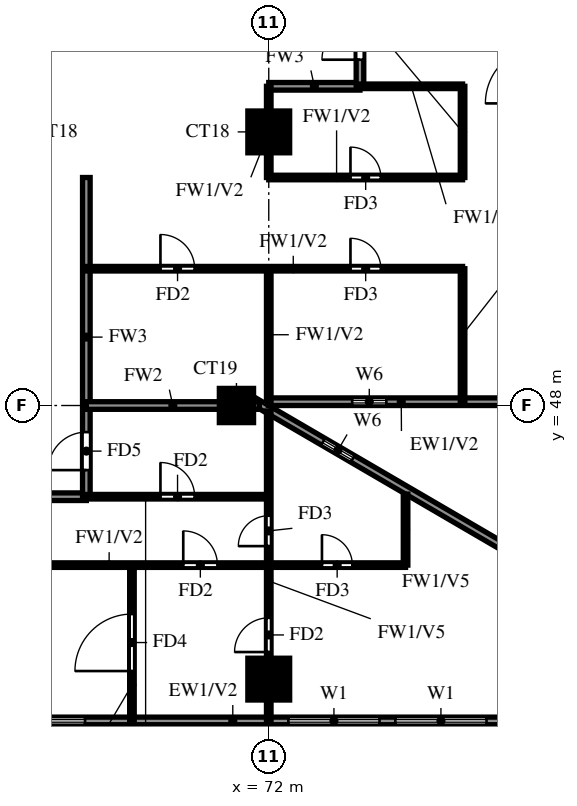
"""IFC4 building model, lengths in metres.
Left out: names, types, materials, properties, quantities, classifications, styles, units other than length and angle.
Written with IfcOpenShell. Run it as: python <this file> out.ifc"""

import sys

from ifc_helpers import new_model, si_unit, direction, frame, frame_2d, origin, origin_2d, place, context, subcontext, project, spatial, rectangle, extrude, source, transform, mapped, element, fill, save


model = new_model("IFC4")
c1 = context("Model", 3, precision=1e-05, world=origin(), true_north=direction((0.0, 1.0)))
c2 = subcontext(c1, "Body", "Model", "MODEL_VIEW")
j1 = project(units=[si_unit("LENGTHUNIT", "METRE"), si_unit("PLANEANGLEUNIT", "RADIAN")], contexts=[c1])
p1 = place(None, origin())
s1 = spatial("IfcSite", under=j1, at=p1, CompositionType="ELEMENT")
p2 = place(p1, origin())
s2 = spatial("IfcBuilding", under=s1, at=p2, CompositionType="ELEMENT")
p3 = place(p2, frame((0.0, 0.0, 120.0)))
s3 = spatial("IfcBuildingStorey", under=s2, at=p3, CompositionType="ELEMENT", Elevation=120.0)
m1 = source(origin(), c2, "Body", "SweptSolid", [
    extrude(rectangle(XDim=1.1, YDim=1.1, at=origin_2d()), origin(), (0.0, 0.0, 1.0), 3.2),
])
p4 = place(p3, frame((72.0, 40.8, 0.0), z_axis=(0.0, 0.0, 1.0), x_axis=(1.0, 0.0, 0.0)))
e1 = element("IfcColumn", 1, at=p4, inside=s3, PredefinedType="COLUMN", context=c2, shape_type="MappedRepresentation", body=[
    mapped(m1, transform((0.0, 0.0, 0.0))),
])
m2 = source(origin(), c2, "Body", "SweptSolid", [
    extrude(rectangle(XDim=0.9, YDim=0.9, at=origin_2d()), origin(), (0.0, 0.0, 1.0), 3.2),
])
p5 = place(p3, frame((71.15, 48.0, 0.0), z_axis=(0.0, 0.0, 1.0), x_axis=(1.0, 0.0, 0.0)))
e2 = element("IfcColumn", 2, at=p5, inside=s3, PredefinedType="COLUMN", context=c2, shape_type="MappedRepresentation", body=[
    mapped(m2, transform((0.0, 0.0, 0.0))),
])
p6 = place(p3, frame((72.0, 55.2, 0.0), z_axis=(0.0, 0.0, 1.0), x_axis=(1.0, 0.0, 0.0)))
e3 = element("IfcColumn", 3, at=p6, inside=s3, PredefinedType="COLUMN", context=c2, shape_type="MappedRepresentation", body=[
    mapped(m1, transform((0.0, 0.0, 0.0))),
])
p7 = place(p3, frame((85.719, 39.881, 0.0), z_axis=(0.0, 0.0, 1.0), x_axis=(-0.86377618652, 0.503875678716, 0.0)))
e4 = element("IfcWall", 4, at=p7, inside=s3, PredefinedType="SOLIDWALL", context=c2, shape_type="SweptSolid", body=[
    extrude(rectangle(XDim=16.311, YDim=0.2, at=frame_2d((8.156, 0.0))), origin(), (0.0, 0.0, 1.0), 3.2),
])
p8 = place(p7, frame((13.326, 0.0, 1.5)))
e5 = element("IfcOpeningElement", 5, at=p8, cuts=e4, PredefinedType="OPENING", context=c2, shape_type="SweptSolid", body=[
    extrude(rectangle(XDim=0.9, YDim=0.9, at=frame_2d((0.45, 0.45))), frame((0.0, 0.11, 0.0), z_axis=(0.0, -1.0, 0.0), x_axis=(1.0, 0.0, 0.0)), (0.0, 0.0, 1.0), 0.22),
])
p9 = place(p3, frame((71.99, 48.1, 0.0), z_axis=(0.0, 0.0, 1.0), x_axis=(1.0, 0.0, 0.0)))
e6 = element("IfcWall", 6, at=p9, inside=s3, PredefinedType="SOLIDWALL", context=c2, shape_type="SweptSolid", body=[
    extrude(rectangle(XDim=6.66, YDim=0.2, at=frame_2d((3.33, 0.0))), origin(), (0.0, 0.0, 1.0), 3.2),
])
p10 = place(p9, frame((2.205, 0.0, 1.5)))
e7 = element("IfcOpeningElement", 7, at=p10, cuts=e6, PredefinedType="OPENING", context=c2, shape_type="SweptSolid", body=[
    extrude(rectangle(XDim=0.9, YDim=0.9, at=frame_2d((0.45, 0.45))), frame((0.0, 0.11, 0.0), z_axis=(0.0, -1.0, 0.0), x_axis=(1.0, 0.0, 0.0)), (0.0, 0.0, 1.0), 0.22),
])
p11 = place(p3, frame((58.8, 39.7, 0.0), z_axis=(0.0, 0.0, 1.0), x_axis=(1.0, 0.0, 0.0)))
e8 = element("IfcWall", 8, at=p11, inside=s3, PredefinedType="SOLIDWALL", context=c2, shape_type="SweptSolid", body=[
    extrude(rectangle(XDim=27.23, YDim=0.2, at=frame_2d((13.615, 0.0))), origin(), (0.0, 0.0, 1.0), 3.2),
])
p12 = place(p11, frame((2.433, 0.0, 0.6)))
e9 = element("IfcOpeningElement", 9, at=p12, cuts=e8, PredefinedType="OPENING", context=c2, shape_type="SweptSolid", body=[
    extrude(rectangle(XDim=2.4, YDim=2.4, at=frame_2d((1.2, 1.2))), frame((0.0, 0.11, 0.0), z_axis=(0.0, -1.0, 0.0), x_axis=(1.0, 0.0, 0.0)), (0.0, 0.0, 1.0), 0.22),
])
p13 = place(p11, frame((5.967, 0.0, 0.6)))
e10 = element("IfcOpeningElement", 10, at=p13, cuts=e8, PredefinedType="OPENING", context=c2, shape_type="SweptSolid", body=[
    extrude(rectangle(XDim=2.4, YDim=2.4, at=frame_2d((1.2, 1.2))), frame((0.0, 0.11, 0.0), z_axis=(0.0, -1.0, 0.0), x_axis=(1.0, 0.0, 0.0)), (0.0, 0.0, 1.0), 0.22),
])
p14 = place(p11, frame((13.715, 0.0, 0.6)))
e11 = element("IfcOpeningElement", 11, at=p14, cuts=e8, PredefinedType="OPENING", context=c2, shape_type="SweptSolid", body=[
    extrude(rectangle(XDim=2.4, YDim=2.4, at=frame_2d((1.2, 1.2))), frame((0.0, 0.11, 0.0), z_axis=(0.0, -1.0, 0.0), x_axis=(1.0, 0.0, 0.0)), (0.0, 0.0, 1.0), 0.22),
])
p15 = place(p11, frame((16.531, 0.0, 0.6)))
e12 = element("IfcOpeningElement", 12, at=p15, cuts=e8, PredefinedType="OPENING", context=c2, shape_type="SweptSolid", body=[
    extrude(rectangle(XDim=2.4, YDim=2.4, at=frame_2d((1.2, 1.2))), frame((0.0, 0.11, 0.0), z_axis=(0.0, -1.0, 0.0), x_axis=(1.0, 0.0, 0.0)), (0.0, 0.0, 1.0), 0.22),
])
p16 = place(p11, frame((19.346, 0.0, 0.6)))
e13 = element("IfcOpeningElement", 13, at=p16, cuts=e8, PredefinedType="OPENING", context=c2, shape_type="SweptSolid", body=[
    extrude(rectangle(XDim=2.4, YDim=2.4, at=frame_2d((1.2, 1.2))), frame((0.0, 0.11, 0.0), z_axis=(0.0, -1.0, 0.0), x_axis=(1.0, 0.0, 0.0)), (0.0, 0.0, 1.0), 0.22),
])
p17 = place(p11, frame((22.161, 0.0, 0.6)))
e14 = element("IfcOpeningElement", 14, at=p17, cuts=e8, PredefinedType="OPENING", context=c2, shape_type="SweptSolid", body=[
    extrude(rectangle(XDim=2.4, YDim=2.4, at=frame_2d((1.2, 1.2))), frame((0.0, 0.11, 0.0), z_axis=(0.0, -1.0, 0.0), x_axis=(1.0, 0.0, 0.0)), (0.0, 0.0, 1.0), 0.22),
])
p18 = place(p11, frame((26.003, 0.0, 0.6)))
e15 = element("IfcOpeningElement", 15, at=p18, cuts=e8, PredefinedType="OPENING", context=c2, shape_type="SweptSolid", body=[
    extrude(rectangle(XDim=0.9, YDim=2.4, at=frame_2d((0.45, 1.2))), frame((0.0, 0.11, 0.0), z_axis=(0.0, -1.0, 0.0), x_axis=(1.0, 0.0, 0.0)), (0.0, 0.0, 1.0), 0.22),
])
p19 = place(p3, frame((60.0, 45.6, 0.0), z_axis=(0.0, 0.0, 1.0), x_axis=(1.0, 0.0, 0.0)))
e16 = element("IfcWall", 16, at=p19, inside=s3, PredefinedType="SOLIDWALL", context=c2, shape_type="SweptSolid", body=[
    extrude(rectangle(XDim=7.2, YDim=0.2, at=frame_2d((3.6, 0.0))), origin(), (0.0, 0.0, 1.0), 3.2),
])
p20 = place(p3, frame((72.0, 56.4, 0.0), z_axis=(0.0, 0.0, 1.0), x_axis=(1.0, 0.0, 0.0)))
e17 = element("IfcWall", 17, at=p20, inside=s3, PredefinedType="SOLIDWALL", context=c2, shape_type="SweptSolid", body=[
    extrude(rectangle(XDim=2.4, YDim=0.2, at=frame_2d((1.2, 0.0))), origin(), (0.0, 0.0, 1.0), 3.2),
])
p21 = place(p3, frame((67.2, 45.6, 0.0), z_axis=(0.0, 0.0, 1.0), x_axis=(0.0, 1.0, 0.0)))
e18 = element("IfcWall", 18, at=p21, inside=s3, PredefinedType="SOLIDWALL", context=c2, shape_type="SweptSolid", body=[
    extrude(rectangle(XDim=8.4, YDim=0.2, at=frame_2d((4.2, 0.0))), origin(), (0.0, 0.0, 1.0), 3.2),
])
p22 = place(p21, frame((0.7, 0.0, 0.0)))
e19 = element("IfcOpeningElement", 19, at=p22, cuts=e18, PredefinedType="OPENING", context=c2, shape_type="SweptSolid", body=[
    extrude(rectangle(XDim=1.0, YDim=2.1, at=frame_2d((0.5, 1.05))), frame((0.0, 0.11, 0.0), z_axis=(0.0, -1.0, 0.0), x_axis=(1.0, 0.0, 0.0)), (0.0, 0.0, 1.0), 0.22),
])
p23 = place(p3, frame((74.4, 56.4, 0.0), z_axis=(0.0, 0.0, 1.0), x_axis=(0.0, 1.0, 0.0)))
e20 = element("IfcWall", 20, at=p23, inside=s3, PredefinedType="SOLIDWALL", context=c2, shape_type="SweptSolid", body=[
    extrude(rectangle(XDim=9.6, YDim=0.2, at=frame_2d((4.8, 0.0))), origin(), (0.0, 0.0, 1.0), 3.2),
])
p24 = place(p23, frame((0.7, 0.0, 0.0)))
e21 = element("IfcOpeningElement", 21, at=p24, cuts=e20, PredefinedType="OPENING", context=c2, shape_type="SweptSolid", body=[
    extrude(rectangle(XDim=1.0, YDim=2.1, at=frame_2d((0.5, 1.05))), frame((0.0, 0.11, 0.0), z_axis=(0.0, -1.0, 0.0), x_axis=(1.0, 0.0, 0.0)), (0.0, 0.0, 1.0), 0.22),
])
p25 = place(p23, frame((3.1, 0.0, 0.0)))
e22 = element("IfcOpeningElement", 22, at=p25, cuts=e20, PredefinedType="OPENING", context=c2, shape_type="SweptSolid", body=[
    extrude(rectangle(XDim=1.0, YDim=2.1, at=frame_2d((0.5, 1.05))), frame((0.0, 0.11, 0.0), z_axis=(0.0, -1.0, 0.0), x_axis=(1.0, 0.0, 0.0)), (0.0, 0.0, 1.0), 0.22),
])
p26 = place(p3, frame((67.2, 48.0, 0.0), z_axis=(0.0, 0.0, 1.0), x_axis=(1.0, 0.0, 0.0)))
e23 = element("IfcWall", 23, at=p26, inside=s3, PredefinedType="SOLIDWALL", context=c2, shape_type="SweptSolid", body=[
    extrude(rectangle(XDim=4.552, YDim=0.2, at=frame_2d((2.276, 0.0))), origin(), (0.0, 0.0, 1.0), 3.2),
])
p27 = place(p3, frame((60.0, 43.8, 0.0), z_axis=(0.0, 0.0, 1.0), x_axis=(1.0, 0.0, 0.0)))
e24 = element("IfcWall", 24, at=p27, inside=s3, PredefinedType="PARTITIONING", context=c2, shape_type="SweptSolid", body=[
    extrude(rectangle(XDim=15.6, YDim=0.12, at=frame_2d((7.8, 0.0))), origin(), (0.0, 0.0, 1.0), 3.2),
])
p28 = place(p27, frame((9.75, 0.0, 0.0)))
e25 = element("IfcOpeningElement", 25, at=p28, cuts=e24, PredefinedType="OPENING", context=c2, shape_type="SweptSolid", body=[
    extrude(rectangle(XDim=0.9, YDim=2.1, at=frame_2d((0.45, 1.05))), frame((0.0, 0.07, 0.0), z_axis=(0.0, -1.0, 0.0), x_axis=(1.0, 0.0, 0.0)), (0.0, 0.0, 1.0), 0.14),
])
p29 = place(p27, frame((3.45, 0.0, 0.0)))
e26 = element("IfcOpeningElement", 26, at=p29, cuts=e24, PredefinedType="OPENING", context=c2, shape_type="SweptSolid", body=[
    extrude(rectangle(XDim=1.5, YDim=2.1, at=frame_2d((0.75, 1.05))), frame((0.0, 0.07, 0.0), z_axis=(0.0, -1.0, 0.0), x_axis=(1.0, 0.0, 0.0)), (0.0, 0.0, 1.0), 0.14),
])
p30 = place(p27, frame((13.4, 0.0, 0.0)))
e27 = element("IfcOpeningElement", 27, at=p30, cuts=e24, PredefinedType="OPENING", context=c2, shape_type="SweptSolid", body=[
    extrude(rectangle(XDim=0.8, YDim=2.1, at=frame_2d((0.4, 1.05))), frame((0.0, 0.07, 0.0), z_axis=(0.0, -1.0, 0.0), x_axis=(1.0, 0.0, 0.0)), (0.0, 0.0, 1.0), 0.14),
])
p31 = place(p3, frame((67.2, 45.6, 0.0), z_axis=(0.0, 0.0, 1.0), x_axis=(1.0, 0.0, 0.0)))
e28 = element("IfcWall", 28, at=p31, inside=s3, PredefinedType="PARTITIONING", context=c2, shape_type="SweptSolid", body=[
    extrude(rectangle(XDim=4.8, YDim=0.12, at=frame_2d((2.4, 0.0))), origin(), (0.0, 0.0, 1.0), 3.2),
])
p32 = place(p31, frame((1.95, 0.0, 0.0)))
e29 = element("IfcOpeningElement", 29, at=p32, cuts=e28, PredefinedType="OPENING", context=c2, shape_type="SweptSolid", body=[
    extrude(rectangle(XDim=0.9, YDim=2.1, at=frame_2d((0.45, 1.05))), frame((0.0, 0.07, 0.0), z_axis=(0.0, -1.0, 0.0), x_axis=(1.0, 0.0, 0.0)), (0.0, 0.0, 1.0), 0.14),
])
p33 = place(p3, frame((67.2, 51.6, 0.0), z_axis=(0.0, 0.0, 1.0), x_axis=(1.0, 0.0, 0.0)))
e30 = element("IfcWall", 30, at=p33, inside=s3, PredefinedType="PARTITIONING", context=c2, shape_type="SweptSolid", body=[
    extrude(rectangle(XDim=9.9, YDim=0.12, at=frame_2d((4.95, 0.0))), origin(), (0.0, 0.0, 1.0), 3.2),
])
p34 = place(p33, frame((6.95, 0.0, 0.0)))
e31 = element("IfcOpeningElement", 31, at=p34, cuts=e30, PredefinedType="OPENING", context=c2, shape_type="SweptSolid", body=[
    extrude(rectangle(XDim=0.8, YDim=2.1, at=frame_2d((0.4, 1.05))), frame((0.0, 0.07, 0.0), z_axis=(0.0, -1.0, 0.0), x_axis=(1.0, 0.0, 0.0)), (0.0, 0.0, 1.0), 0.14),
])
p35 = place(p33, frame((1.95, 0.0, 0.0)))
e32 = element("IfcOpeningElement", 32, at=p35, cuts=e30, PredefinedType="OPENING", context=c2, shape_type="SweptSolid", body=[
    extrude(rectangle(XDim=0.9, YDim=2.1, at=frame_2d((0.45, 1.05))), frame((0.0, 0.07, 0.0), z_axis=(0.0, -1.0, 0.0), x_axis=(1.0, 0.0, 0.0)), (0.0, 0.0, 1.0), 0.14),
])
p36 = place(p3, frame((72.0, 54.0, 0.0), z_axis=(0.0, 0.0, 1.0), x_axis=(1.0, 0.0, 0.0)))
e33 = element("IfcWall", 33, at=p36, inside=s3, PredefinedType="PARTITIONING", context=c2, shape_type="SweptSolid", body=[
    extrude(rectangle(XDim=5.1, YDim=0.12, at=frame_2d((2.55, 0.0))), origin(), (0.0, 0.0, 1.0), 3.2),
])
p37 = place(p36, frame((2.15, 0.0, 0.0)))
e34 = element("IfcOpeningElement", 34, at=p37, cuts=e33, PredefinedType="OPENING", context=c2, shape_type="SweptSolid", body=[
    extrude(rectangle(XDim=0.8, YDim=2.1, at=frame_2d((0.4, 1.05))), frame((0.0, 0.07, 0.0), z_axis=(0.0, -1.0, 0.0), x_axis=(1.0, 0.0, 0.0)), (0.0, 0.0, 1.0), 0.14),
])
p38 = place(p3, frame((74.4, 56.4, 0.0), z_axis=(0.0, 0.0, 1.0), x_axis=(1.0, 0.0, 0.0)))
e35 = element("IfcWall", 35, at=p38, inside=s3, PredefinedType="PARTITIONING", context=c2, shape_type="SweptSolid", body=[
    extrude(rectangle(XDim=2.7, YDim=0.12, at=frame_2d((1.35, 0.0))), origin(), (0.0, 0.0, 1.0), 3.2),
])
p39 = place(p3, frame((68.4, 39.725, 0.0), z_axis=(0.0, 0.0, 1.0), x_axis=(0.0, 1.0, 0.0)))
e36 = element("IfcWall", 36, at=p39, inside=s3, PredefinedType="PARTITIONING", context=c2, shape_type="SweptSolid", body=[
    extrude(rectangle(XDim=4.075, YDim=0.12, at=frame_2d((2.038, 0.0))), origin(), (0.0, 0.0, 1.0), 3.2),
])
p40 = place(p39, frame((1.288, 0.0, 0.0)))
e37 = element("IfcOpeningElement", 37, at=p40, cuts=e36, PredefinedType="OPENING", context=c2, shape_type="SweptSolid", body=[
    extrude(rectangle(XDim=1.5, YDim=2.1, at=frame_2d((0.75, 1.05))), frame((0.0, 0.07, 0.0), z_axis=(0.0, -1.0, 0.0), x_axis=(1.0, 0.0, 0.0)), (0.0, 0.0, 1.0), 0.14),
])
p41 = place(p3, frame((72.0, 39.725, 0.0), z_axis=(0.0, 0.0, 1.0), x_axis=(0.0, 1.0, 0.0)))
e38 = element("IfcWall", 38, at=p41, inside=s3, PredefinedType="PARTITIONING", context=c2, shape_type="SweptSolid", body=[
    extrude(rectangle(XDim=8.13, YDim=0.12, at=frame_2d((4.065, 0.0))), origin(), (0.0, 0.0, 1.0), 2.3),
])
p42 = place(p41, frame((1.788, 0.0, 0.0)))
e39 = element("IfcOpeningElement", 39, at=p42, cuts=e38, PredefinedType="OPENING", context=c2, shape_type="SweptSolid", body=[
    extrude(rectangle(XDim=0.9, YDim=2.1, at=frame_2d((0.45, 1.05))), frame((0.0, 0.07, 0.0), z_axis=(0.0, -1.0, 0.0), x_axis=(1.0, 0.0, 0.0)), (0.0, 0.0, 1.0), 0.14),
])
p43 = place(p41, frame((4.575, 0.0, 0.0)))
e40 = element("IfcOpeningElement", 40, at=p43, cuts=e38, PredefinedType="OPENING", context=c2, shape_type="SweptSolid", body=[
    extrude(rectangle(XDim=0.8, YDim=2.1, at=frame_2d((0.4, 1.05))), frame((0.0, 0.07, 0.0), z_axis=(0.0, -1.0, 0.0), x_axis=(1.0, 0.0, 0.0)), (0.0, 0.0, 1.0), 0.14),
])
p44 = place(p3, frame((72.0, 48.125, 0.0), z_axis=(0.0, 0.0, 1.0), x_axis=(0.0, 1.0, 0.0)))
e41 = element("IfcWall", 41, at=p44, inside=s3, PredefinedType="PARTITIONING", context=c2, shape_type="SweptSolid", body=[
    extrude(rectangle(XDim=3.475, YDim=0.12, at=frame_2d((1.738, 0.0))), origin(), (0.0, 0.0, 1.0), 3.2),
])
p45 = place(p3, frame((72.0, 54.0, 0.0), z_axis=(0.0, 0.0, 1.0), x_axis=(0.0, 1.0, 0.0)))
e42 = element("IfcWall", 42, at=p45, inside=s3, PredefinedType="PARTITIONING", context=c2, shape_type="SweptSolid", body=[
    extrude(rectangle(XDim=2.4, YDim=0.12, at=frame_2d((1.2, 0.0))), origin(), (0.0, 0.0, 1.0), 3.2),
])
p46 = place(p3, frame((75.6, 43.8, 0.0), z_axis=(0.0, 0.0, 1.0), x_axis=(0.0, 1.0, 0.0)))
e43 = element("IfcWall", 43, at=p46, inside=s3, PredefinedType="PARTITIONING", context=c2, shape_type="SweptSolid", body=[
    extrude(rectangle(XDim=1.868, YDim=0.12, at=frame_2d((0.934, 0.0))), origin(), (0.0, 0.0, 1.0), 2.3),
])
p47 = place(p3, frame((77.1, 48.125, 0.0), z_axis=(0.0, 0.0, 1.0), x_axis=(0.0, 1.0, 0.0)))
e44 = element("IfcWall", 44, at=p47, inside=s3, PredefinedType="PARTITIONING", context=c2, shape_type="SweptSolid", body=[
    extrude(rectangle(XDim=3.475, YDim=0.12, at=frame_2d((1.738, 0.0))), origin(), (0.0, 0.0, 1.0), 3.2),
])
p48 = place(p3, frame((77.1, 54.0, 0.0), z_axis=(0.0, 0.0, 1.0), x_axis=(0.0, 1.0, 0.0)))
e45 = element("IfcWall", 45, at=p48, inside=s3, PredefinedType="PARTITIONING", context=c2, shape_type="SweptSolid", body=[
    extrude(rectangle(XDim=2.4, YDim=0.12, at=frame_2d((1.2, 0.0))), origin(), (0.0, 0.0, 1.0), 3.2),
])
p49 = place(p8, origin())
e46 = element("IfcWindow", 46, at=p49, inside=s3, PartitioningType="SINGLE_PANEL", PredefinedType="WINDOW", context=c2, shape_type="SweptSolid", body=[
    extrude(rectangle(XDim=0.9, YDim=0.9, at=frame_2d((0.45, 0.45))), frame((0.0, 0.03, 0.0), z_axis=(0.0, -1.0, 0.0), x_axis=(1.0, 0.0, 0.0)), (0.0, 0.0, 1.0), 0.06),
])
fill(e5, e46)
p50 = place(p10, origin())
e47 = element("IfcWindow", 47, at=p50, inside=s3, PartitioningType="SINGLE_PANEL", PredefinedType="WINDOW", context=c2, shape_type="SweptSolid", body=[
    extrude(rectangle(XDim=0.9, YDim=0.9, at=frame_2d((0.45, 0.45))), frame((0.0, 0.03, 0.0), z_axis=(0.0, -1.0, 0.0), x_axis=(1.0, 0.0, 0.0)), (0.0, 0.0, 1.0), 0.06),
])
fill(e7, e47)
p51 = place(p13, origin())
e48 = element("IfcWindow", 48, at=p51, inside=s3, PartitioningType="DOUBLE_PANEL_VERTICAL", PredefinedType="WINDOW", context=c2, shape_type="SweptSolid", body=[
    extrude(rectangle(XDim=2.4, YDim=2.4, at=frame_2d((1.2, 1.2))), frame((0.0, 0.03, 0.0), z_axis=(0.0, -1.0, 0.0), x_axis=(1.0, 0.0, 0.0)), (0.0, 0.0, 1.0), 0.06),
])
fill(e10, e48)
p52 = place(p14, origin())
e49 = element("IfcWindow", 49, at=p52, inside=s3, PartitioningType="DOUBLE_PANEL_VERTICAL", PredefinedType="WINDOW", context=c2, shape_type="SweptSolid", body=[
    extrude(rectangle(XDim=2.4, YDim=2.4, at=frame_2d((1.2, 1.2))), frame((0.0, 0.03, 0.0), z_axis=(0.0, -1.0, 0.0), x_axis=(1.0, 0.0, 0.0)), (0.0, 0.0, 1.0), 0.06),
])
fill(e11, e49)
p53 = place(p15, origin())
e50 = element("IfcWindow", 50, at=p53, inside=s3, PartitioningType="DOUBLE_PANEL_VERTICAL", PredefinedType="WINDOW", context=c2, shape_type="SweptSolid", body=[
    extrude(rectangle(XDim=2.4, YDim=2.4, at=frame_2d((1.2, 1.2))), frame((0.0, 0.03, 0.0), z_axis=(0.0, -1.0, 0.0), x_axis=(1.0, 0.0, 0.0)), (0.0, 0.0, 1.0), 0.06),
])
fill(e12, e50)
p54 = place(p24, origin())
e51 = element("IfcDoor", 51, at=p54, inside=s3, OperationType="SINGLE_SWING_LEFT", PredefinedType="DOOR", context=c2, shape_type="SweptSolid", body=[
    extrude(rectangle(XDim=1.0, YDim=2.1, at=frame_2d((0.5, 1.05))), frame((0.0, 0.025, 0.0), z_axis=(0.0, -1.0, 0.0), x_axis=(1.0, 0.0, 0.0)), (0.0, 0.0, 1.0), 0.05),
])
fill(e21, e51)
p55 = place(p34, origin())
e52 = element("IfcDoor", 52, at=p55, inside=s3, OperationType="SINGLE_SWING_LEFT", PredefinedType="DOOR", context=c2, shape_type="SweptSolid", body=[
    extrude(rectangle(XDim=0.8, YDim=2.1, at=frame_2d((0.4, 1.05))), frame((0.0, 0.025, 0.0), z_axis=(0.0, -1.0, 0.0), x_axis=(1.0, 0.0, 0.0)), (0.0, 0.0, 1.0), 0.05),
])
fill(e31, e52)
p56 = place(p37, origin())
e53 = element("IfcDoor", 53, at=p56, inside=s3, OperationType="SINGLE_SWING_LEFT", PredefinedType="DOOR", context=c2, shape_type="SweptSolid", body=[
    extrude(rectangle(XDim=0.8, YDim=2.1, at=frame_2d((0.4, 1.05))), frame((0.0, 0.025, 0.0), z_axis=(0.0, -1.0, 0.0), x_axis=(1.0, 0.0, 0.0)), (0.0, 0.0, 1.0), 0.05),
])
fill(e34, e53)
p57 = place(p35, origin())
e54 = element("IfcDoor", 54, at=p57, inside=s3, OperationType="SINGLE_SWING_RIGHT", PredefinedType="DOOR", context=c2, shape_type="SweptSolid", body=[
    extrude(rectangle(XDim=0.9, YDim=2.1, at=frame_2d((0.45, 1.05))), frame((0.0, 0.025, 0.0), z_axis=(0.0, -1.0, 0.0), x_axis=(1.0, 0.0, 0.0)), (0.0, 0.0, 1.0), 0.05),
])
fill(e32, e54)
p58 = place(p40, origin())
e55 = element("IfcDoor", 55, at=p58, inside=s3, OperationType="SINGLE_SWING_LEFT", PredefinedType="DOOR", context=c2, shape_type="SweptSolid", body=[
    extrude(rectangle(XDim=1.5, YDim=2.1, at=frame_2d((0.75, 1.05))), frame((0.0, 0.025, 0.0), z_axis=(0.0, -1.0, 0.0), x_axis=(1.0, 0.0, 0.0)), (0.0, 0.0, 1.0), 0.05),
])
fill(e37, e55)
p59 = place(p32, origin())
e56 = element("IfcDoor", 56, at=p59, inside=s3, OperationType="SINGLE_SWING_RIGHT", PredefinedType="DOOR", context=c2, shape_type="SweptSolid", body=[
    extrude(rectangle(XDim=0.9, YDim=2.1, at=frame_2d((0.45, 1.05))), frame((0.0, 0.025, 0.0), z_axis=(0.0, -1.0, 0.0), x_axis=(1.0, 0.0, 0.0)), (0.0, 0.0, 1.0), 0.05),
])
fill(e29, e56)
p60 = place(p22, origin())
e57 = element("IfcDoor", 57, at=p60, inside=s3, OperationType="SINGLE_SWING_LEFT", PredefinedType="DOOR", context=c2, shape_type="SweptSolid", body=[
    extrude(rectangle(XDim=1.0, YDim=2.1, at=frame_2d((0.5, 1.05))), frame((0.0, 0.025, 0.0), z_axis=(0.0, -1.0, 0.0), x_axis=(1.0, 0.0, 0.0)), (0.0, 0.0, 1.0), 0.05),
])
fill(e19, e57)
p61 = place(p28, origin())
e58 = element("IfcDoor", 58, at=p61, inside=s3, OperationType="SINGLE_SWING_LEFT", PredefinedType="DOOR", context=c2, shape_type="SweptSolid", body=[
    extrude(rectangle(XDim=0.9, YDim=2.1, at=frame_2d((0.45, 1.05))), frame((0.0, 0.025, 0.0), z_axis=(0.0, -1.0, 0.0), x_axis=(1.0, 0.0, 0.0)), (0.0, 0.0, 1.0), 0.05),
])
fill(e25, e58)
p62 = place(p42, origin())
e59 = element("IfcDoor", 59, at=p62, inside=s3, OperationType="SINGLE_SWING_RIGHT", PredefinedType="DOOR", context=c2, shape_type="SweptSolid", body=[
    extrude(rectangle(XDim=0.9, YDim=2.1, at=frame_2d((0.45, 1.05))), frame((0.0, 0.025, 0.0), z_axis=(0.0, -1.0, 0.0), x_axis=(1.0, 0.0, 0.0)), (0.0, 0.0, 1.0), 0.05),
])
fill(e39, e59)
p63 = place(p43, origin())
e60 = element("IfcDoor", 60, at=p63, inside=s3, OperationType="SINGLE_SWING_LEFT", PredefinedType="DOOR", context=c2, shape_type="SweptSolid", body=[
    extrude(rectangle(XDim=0.8, YDim=2.1, at=frame_2d((0.4, 1.05))), frame((0.0, 0.025, 0.0), z_axis=(0.0, -1.0, 0.0), x_axis=(1.0, 0.0, 0.0)), (0.0, 0.0, 1.0), 0.05),
])
fill(e40, e60)
p64 = place(p30, origin())
e61 = element("IfcDoor", 61, at=p64, inside=s3, OperationType="SINGLE_SWING_RIGHT", PredefinedType="DOOR", context=c2, shape_type="SweptSolid", body=[
    extrude(rectangle(XDim=0.8, YDim=2.1, at=frame_2d((0.4, 1.05))), frame((0.0, 0.025, 0.0), z_axis=(0.0, -1.0, 0.0), x_axis=(1.0, 0.0, 0.0)), (0.0, 0.0, 1.0), 0.05),
])
fill(e27, e61)
save(model, sys.argv[1])
